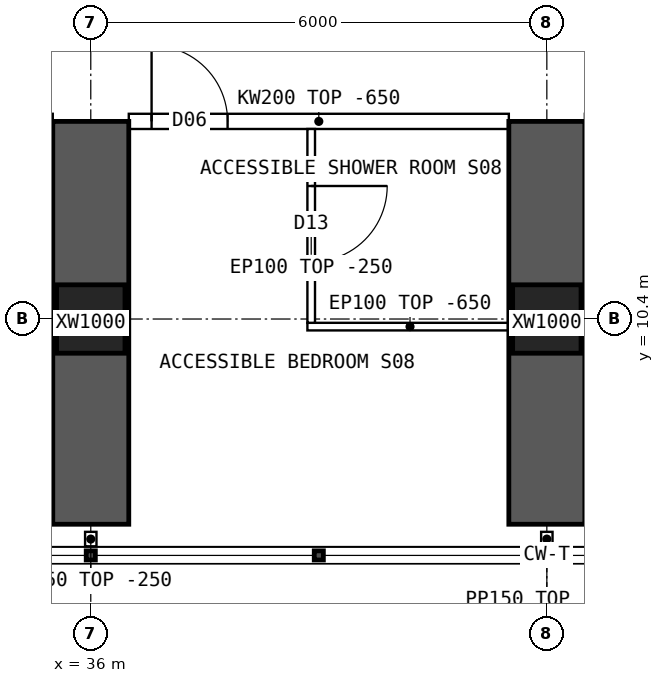
"""IFC4 building model, lengths in metres.
Left out: names, types, materials, properties, quantities, classifications, styles, units other than length and angle.
Written with IfcOpenShell. Run it as: python <this file> out.ifc"""

import sys

from ifc_helpers import new_model, si_unit, direction, frame, frame_2d, origin, origin_2d, place, context, subcontext, project, spatial, polyline, rectangle, hollow_rectangle, outline, extrude, element, fill, save


model = new_model("IFC4")
c1 = context("Model", 3, precision=1e-05, world=origin(), true_north=direction((0.0, 1.0)))
c2 = subcontext(c1, "Body", "Model", "MODEL_VIEW")
j1 = project(units=[si_unit("LENGTHUNIT", "METRE"), si_unit("PLANEANGLEUNIT", "RADIAN")], contexts=[c1])
p1 = place(None, origin())
s1 = spatial("IfcSite", under=j1, at=p1, CompositionType="ELEMENT")
p2 = place(p1, origin())
s2 = spatial("IfcBuilding", under=s1, at=p2, CompositionType="ELEMENT")
p3 = place(p2, frame((0.0, 0.0, 42.7)))
s3 = spatial("IfcBuildingStorey", under=s2, at=p3, CompositionType="ELEMENT", Elevation=42.7)
for number, where, z_axis, x_axis in (
    (1, (36.0, 10.4, 0.0), (0.0, 0.0, 1.0), (1.0, 0.0, 0.0)),
    (2, (42.0, 10.4, 0.0), (0.0, 0.0, 1.0), (1.0, 0.0, 0.0)),
):
    element("IfcColumn", number, at=place(p3, frame(where, z_axis=z_axis, x_axis=x_axis)), inside=s3, PredefinedType="COLUMN", context=c2, shape_type="SweptSolid", body=[
        extrude(hollow_rectangle(XDim=0.9, YDim=0.9, WallThickness=0.09, at=origin_2d()), origin(), (0.0, 0.0, 1.0), 3.75),
    ])
for number, where, z_axis, x_axis in (
    (3, (36.0, 7.7, 0.0), (0.0, 0.0, 1.0), (0.0, 1.0, 0.0)),
    (4, (42.0, 7.7, 0.0), (0.0, 0.0, 1.0), (0.0, 1.0, 0.0)),
):
    element("IfcWall", number, at=place(p3, frame(where, z_axis=z_axis, x_axis=x_axis)), inside=s3, PredefinedType="SHEAR", context=c2, shape_type="SweptSolid", body=[
        extrude(rectangle(XDim=5.3, YDim=1.0, at=frame_2d((2.65, 0.0))), origin(), (0.0, 0.0, 1.0), 3.75),
    ])
p4 = place(p3, frame((36.5, 13.0, 0.0), z_axis=(0.0, 0.0, 1.0), x_axis=(1.0, 0.0, 0.0)))
e5 = element("IfcWall", 5, at=p4, inside=s3, PredefinedType="SOLIDWALL", context=c2, shape_type="SweptSolid", body=[
    extrude(outline(polyline([(0.0, 0.0), (5.0, 0.0), (5.0, 3.1), (0.0, 3.1), (0.0, 0.0)])), frame((0.0, 0.1, 0.0), z_axis=(0.0, -1.0, 0.0), x_axis=(1.0, 0.0, 0.0)), (0.0, 0.0, 1.0), 0.2),
])
p5 = place(p4, frame((0.3, 0.0, 0.0)))
e6 = element("IfcOpeningElement", 6, at=p5, cuts=e5, PredefinedType="OPENING", context=c2, shape_type="SweptSolid", body=[
    extrude(rectangle(XDim=1.0, YDim=2.1, at=frame_2d((0.5, 1.05))), frame((0.0, 0.11, 0.0), z_axis=(0.0, -1.0, 0.0), x_axis=(1.0, 0.0, 0.0)), (0.0, 0.0, 1.0), 0.22),
])
p6 = place(p3, frame((35.55, 10.1, 0.0), z_axis=(0.0, 0.0, 1.0), x_axis=(-1.0, 0.0, 0.0)))
e7 = element("IfcWall", 7, at=p6, inside=s3, PredefinedType="PARTITIONING", context=c2, shape_type="SweptSolid", body=[
    extrude(rectangle(XDim=1.3, YDim=0.1, at=frame_2d((0.65, 0.0))), origin(), (0.0, 0.0, 1.0), 3.5),
])
p7 = place(p6, frame((0.225, 0.0, 0.0)))
e8 = element("IfcOpeningElement", 8, at=p7, cuts=e7, PredefinedType="OPENING", context=c2, shape_type="SweptSolid", body=[
    extrude(rectangle(XDim=0.9, YDim=2.1, at=frame_2d((0.45, 1.05))), frame((0.0, 0.06, 0.0), z_axis=(0.0, -1.0, 0.0), x_axis=(1.0, 0.0, 0.0)), (0.0, 0.0, 1.0), 0.12),
])
p8 = place(p3, frame((38.85, 10.3, 0.0), z_axis=(0.0, 0.0, 1.0), x_axis=(1.0, 0.0, 0.0)))
e9 = element("IfcWall", 9, at=p8, inside=s3, PredefinedType="PARTITIONING", context=c2, shape_type="SweptSolid", body=[
    extrude(outline(polyline([(0.0, 0.0), (2.7, 0.0), (2.7, 3.1), (0.0, 3.1), (0.0, 0.0)])), frame((0.0, 0.05, 0.0), z_axis=(0.0, -1.0, 0.0), x_axis=(1.0, 0.0, 0.0)), (0.0, 0.0, 1.0), 0.1),
])
p9 = place(p3, frame((38.9, 10.35, 0.0), z_axis=(0.0, 0.0, 1.0), x_axis=(0.0, 1.0, 0.0)))
e10 = element("IfcWall", 10, at=p9, inside=s3, PredefinedType="PARTITIONING", context=c2, shape_type="SweptSolid", body=[
    extrude(outline(polyline([(0.0, 0.0), (2.55, 0.0), (2.55, 3.1), (2.502, 3.1), (2.5, 3.5), (0.252, 3.5), (0.25, 3.1), (0.0, 3.1), (0.0, 0.0)])), frame((0.0, 0.05, 0.0), z_axis=(0.0, -1.0, 0.0), x_axis=(1.0, 0.0, 0.0)), (0.0, 0.0, 1.0), 0.1),
])
p10 = place(p9, frame((0.8, 0.0, 0.0)))
e11 = element("IfcOpeningElement", 11, at=p10, cuts=e10, PredefinedType="OPENING", context=c2, shape_type="SweptSolid", body=[
    extrude(rectangle(XDim=1.0, YDim=2.1, at=frame_2d((0.5, 1.05))), frame((0.0, 0.06, 0.0), z_axis=(0.0, -1.0, 0.0), x_axis=(1.0, 0.0, 0.0)), (0.0, 0.0, 1.0), 0.12),
])
for number, where, z_axis, x_axis in (
    (12, (36.0, 7.6, 0.0), (0.0, 0.0, 1.0), (0.0, -1.0, 0.0)),
    (13, (42.0, 7.6, 0.0), (0.0, 0.0, 1.0), (0.0, -1.0, 0.0)),
):
    element("IfcWall", number, at=place(p3, frame(where, z_axis=z_axis, x_axis=x_axis)), inside=s3, PredefinedType="PARTITIONING", context=c2, shape_type="SweptSolid", body=[
        extrude(rectangle(XDim=0.19, YDim=0.15, at=frame_2d((0.095, 0.0))), origin(), (0.0, 0.0, 1.0), 3.5),
    ])
p11 = place(p10, origin())
e14 = element("IfcDoor", 14, at=p11, inside=s3, OperationType="SINGLE_SWING_RIGHT", PredefinedType="DOOR", context=c2, shape_type="SweptSolid", body=[
    extrude(rectangle(XDim=1.0, YDim=2.1, at=frame_2d((0.5, 1.05))), frame((0.0, 0.025, 0.0), z_axis=(0.0, -1.0, 0.0), x_axis=(1.0, 0.0, 0.0)), (0.0, 0.0, 1.0), 0.05),
])
fill(e11, e14)
p12 = place(p5, origin())
e15 = element("IfcDoor", 15, at=p12, inside=s3, OperationType="SINGLE_SWING_LEFT", PredefinedType="DOOR", context=c2, shape_type="SweptSolid", body=[
    extrude(rectangle(XDim=1.0, YDim=2.1, at=frame_2d((0.5, 1.05))), frame((0.0, 0.025, 0.0), z_axis=(0.0, -1.0, 0.0), x_axis=(1.0, 0.0, 0.0)), (0.0, 0.0, 1.0), 0.05),
])
fill(e6, e15)
save(model, sys.argv[1])
